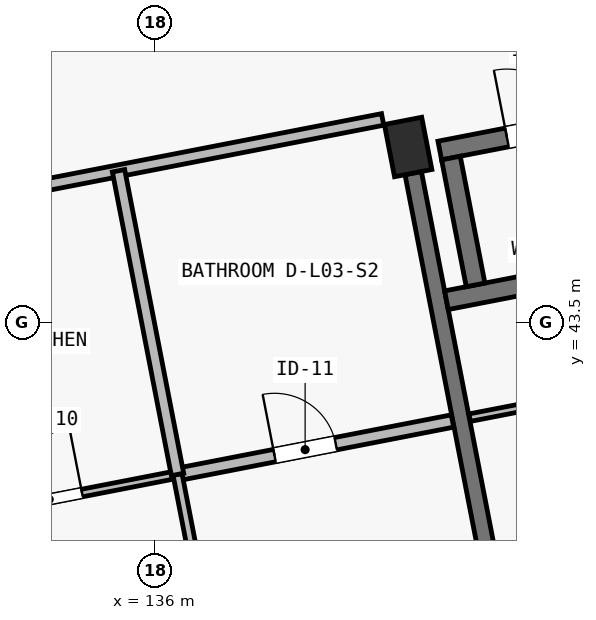
"""IFC4 building model, lengths in metres.
Left out: names, types, materials, properties, quantities, classifications, styles, units other than length and angle.
Written with IfcOpenShell. Run it as: python <this file> out.ifc"""

import sys

from ifc_helpers import new_model, si_unit, direction, frame, frame_2d, origin, origin_2d, place, context, subcontext, project, spatial, rectangle, extrude, element, fill, save


model = new_model("IFC4")
c1 = context("Model", 3, precision=1e-05, world=origin(), true_north=direction((0.0, 1.0)))
c2 = subcontext(c1, "Body", "Model", "MODEL_VIEW")
j1 = project(units=[si_unit("LENGTHUNIT", "METRE"), si_unit("PLANEANGLEUNIT", "RADIAN")], contexts=[c1])
p1 = place(None, origin())
s1 = spatial("IfcSite", under=j1, at=p1, CompositionType="ELEMENT")
p2 = place(p1, origin())
s2 = spatial("IfcBuilding", under=s1, at=p2, CompositionType="ELEMENT")
p3 = place(p2, frame((0.0, 0.0, 11.65)))
s3 = spatial("IfcBuildingStorey", under=s2, at=p3, CompositionType="ELEMENT", Elevation=11.65)
p4 = place(p3, frame((139.331, 45.811, 0.0), z_axis=(0.0, 0.0, 1.0), x_axis=(0.981627183448, 0.190808995377, 0.0)))
e1 = element("IfcColumn", 1, at=p4, inside=s3, PredefinedType="COLUMN", context=c2, shape_type="SweptSolid", body=[
    extrude(rectangle(XDim=0.5, YDim=0.7, at=origin_2d()), origin(), (0.0, 0.0, 1.0), 3.25),
])
p5 = place(p3, frame((140.714, 38.694, 0.0), z_axis=(0.0, 0.0, 1.0), x_axis=(-0.190819465253, 0.981625148252, 0.0)))
e2 = element("IfcWall", 2, at=p5, inside=s3, PredefinedType="SHEAR", context=c2, shape_type="SweptSolid", body=[
    extrude(rectangle(XDim=6.9, YDim=0.22, at=frame_2d((3.45, 0.0))), origin(), (0.0, 0.0, 1.0), 2.5),
])
p6 = place(p3, frame((139.835, 43.795, 0.0), z_axis=(0.0, 0.0, 1.0), x_axis=(0.981624737535, 0.190821578075, 0.0)))
e3 = element("IfcWall", 3, at=p6, inside=s3, PredefinedType="SHEAR", context=c2, shape_type="SweptSolid", body=[
    extrude(rectangle(XDim=2.99, YDim=0.25, at=frame_2d((1.495, 0.0))), origin(), (0.0, 0.0, 1.0), 3.25),
])
p7 = place(p3, frame((139.748, 45.764, 0.0), z_axis=(0.0, 0.0, 1.0), x_axis=(0.981630445883, 0.190792210834, 0.0)))
e4 = element("IfcWall", 4, at=p7, inside=s3, PredefinedType="SHEAR", context=c2, shape_type="SweptSolid", body=[
    extrude(rectangle(XDim=2.7, YDim=0.25, at=frame_2d((1.35, 0.0))), origin(), (0.0, 0.0, 1.0), 3.25),
])
p8 = place(p7, frame((0.9, 0.0, 0.0)))
e5 = element("IfcOpeningElement", 5, at=p8, cuts=e4, PredefinedType="OPENING", context=c2, shape_type="SweptSolid", body=[
    extrude(rectangle(XDim=0.9, YDim=2.05, at=frame_2d((0.45, 1.025))), frame((0.0, 0.14, 0.0), z_axis=(0.0, -1.0, 0.0), x_axis=(1.0, 0.0, 0.0)), (0.0, 0.0, 1.0), 0.28),
])
p9 = place(p3, frame((140.218, 43.997, 0.0), z_axis=(0.0, 0.0, 1.0), x_axis=(-0.190727425199, 0.981643035567, 0.0)))
e6 = element("IfcWall", 6, at=p9, inside=s3, PredefinedType="SHEAR", context=c2, shape_type="SweptSolid", body=[
    extrude(rectangle(XDim=1.7, YDim=0.25, at=frame_2d((0.85, 0.0))), origin(), (0.0, 0.0, 1.0), 3.25),
])
p10 = place(p3, frame((132.046, 44.823, 0.0), z_axis=(0.0, 0.0, 1.0), x_axis=(0.9816234647, 0.190828125677, 0.0)))
e7 = element("IfcWall", 7, at=p10, inside=s3, PredefinedType="PARTITIONING", context=c2, shape_type="SweptSolid", body=[
    extrude(rectangle(XDim=7.08, YDim=0.155, at=frame_2d((3.54, 0.0))), origin(), (0.0, 0.0, 1.0), 2.97),
])
p11 = place(p10, frame((1.33, 0.0, 0.0)))
e8 = element("IfcOpeningElement", 8, at=p11, cuts=e7, PredefinedType="OPENING", context=c2, shape_type="SweptSolid", body=[
    extrude(rectangle(XDim=0.98, YDim=2.15, at=frame_2d((0.49, 1.075))), frame((0.0, 0.093, 0.0), z_axis=(0.0, -1.0, 0.0), x_axis=(1.0, 0.0, 0.0)), (0.0, 0.0, 1.0), 0.185),
])
p12 = place(p3, frame((132.68, 40.8, 0.0), z_axis=(0.0, 0.0, 1.0), x_axis=(0.981626422232, 0.190812911449, 0.0)))
e9 = element("IfcWall", 9, at=p12, inside=s3, PredefinedType="PARTITIONING", context=c2, shape_type="SweptSolid", body=[
    extrude(rectangle(XDim=3.685, YDim=0.1, at=frame_2d((1.842, 0.0))), origin(), (0.0, 0.0, 1.0), 2.97),
])
p13 = place(p12, frame((1.525, 0.0, 0.0)))
e10 = element("IfcOpeningElement", 10, at=p13, cuts=e9, PredefinedType="OPENING", context=c2, shape_type="SweptSolid", body=[
    extrude(rectangle(XDim=0.88, YDim=2.1, at=frame_2d((0.44, 1.05))), frame((0.0, 0.065, 0.0), z_axis=(0.0, -1.0, 0.0), x_axis=(1.0, 0.0, 0.0)), (0.0, 0.0, 1.0), 0.13),
])
p14 = place(p3, frame((136.297, 41.503, 0.0), z_axis=(0.0, 0.0, 1.0), x_axis=(0.981628834294, 0.190800502313, 0.0)))
e11 = element("IfcWall", 11, at=p14, inside=s3, PredefinedType="PLUMBINGWALL", context=c2, shape_type="SweptSolid", body=[
    extrude(rectangle(XDim=3.685, YDim=0.165, at=frame_2d((1.843, 0.0))), origin(), (0.0, 0.0, 1.0), 2.97),
])
p15 = place(p14, frame((1.3, 0.0, 0.0)))
e12 = element("IfcOpeningElement", 12, at=p15, cuts=e11, PredefinedType="OPENING", context=c2, shape_type="SweptSolid", body=[
    extrude(rectangle(XDim=0.82, YDim=2.08, at=frame_2d((0.41, 1.04))), frame((0.0, 0.097, 0.0), z_axis=(0.0, -1.0, 0.0), x_axis=(1.0, 0.0, 0.0)), (0.0, 0.0, 1.0), 0.195),
])
p16 = place(p3, frame((137.125, 37.242, 0.0), z_axis=(0.0, 0.0, 1.0), x_axis=(-0.190812443151, 0.981626513262, 0.0)))
e13 = element("IfcWall", 13, at=p16, inside=s3, PredefinedType="PARTITIONING", context=c2, shape_type="SweptSolid", body=[
    extrude(rectangle(XDim=4.34, YDim=0.12, at=frame_2d((2.17, 0.0))), origin(), (0.0, 0.0, 1.0), 2.97),
])
p17 = place(p16, frame((1.35, 0.0, 0.0)))
e14 = element("IfcOpeningElement", 14, at=p17, cuts=e13, PredefinedType="OPENING", context=c2, shape_type="SweptSolid", body=[
    extrude(rectangle(XDim=0.9, YDim=2.1, at=frame_2d((0.45, 1.05))), frame((0.0, 0.075, 0.0), z_axis=(0.0, -1.0, 0.0), x_axis=(1.0, 0.0, 0.0)), (0.0, 0.0, 1.0), 0.15),
])
p18 = place(p3, frame((136.297, 41.503, 0.0), z_axis=(0.0, 0.0, 1.0), x_axis=(-0.190807044121, 0.981627562731, 0.0)))
e15 = element("IfcWall", 15, at=p18, inside=s3, PredefinedType="PLUMBINGWALL", context=c2, shape_type="SweptSolid", body=[
    extrude(rectangle(XDim=4.07, YDim=0.165, at=frame_2d((2.035, 0.0))), origin(), (0.0, 0.0, 1.0), 2.97),
])
p19 = place(p3, frame((140.14, 42.25, 0.0), z_axis=(0.0, 0.0, 1.0), x_axis=(0.98162014174, 0.190845218255, 0.0)))
e16 = element("IfcWall", 16, at=p19, inside=s3, PredefinedType="PARTITIONING", context=c2, shape_type="SweptSolid", body=[
    extrude(rectangle(XDim=5.08, YDim=0.1, at=frame_2d((2.54, 0.0))), origin(), (0.0, 0.0, 1.0), 2.97),
])
p20 = place(p19, frame((3.595, 0.0, 0.0)))
e17 = element("IfcOpeningElement", 17, at=p20, cuts=e16, PredefinedType="OPENING", context=c2, shape_type="SweptSolid", body=[
    extrude(rectangle(XDim=0.88, YDim=2.1, at=frame_2d((0.44, 1.05))), frame((0.0, 0.065, 0.0), z_axis=(0.0, -1.0, 0.0), x_axis=(1.0, 0.0, 0.0)), (0.0, 0.0, 1.0), 0.13),
])
p21 = place(p3, frame((131.772, 46.909, 0.0), z_axis=(0.0, 0.0, 1.0), x_axis=(0.981622468528, 0.190833249935, 0.0)))
e18 = element("IfcWall", 18, at=p21, inside=s3, PredefinedType="PARTITIONING", context=c2, shape_type="SweptSolid", body=[
    extrude(rectangle(XDim=6.82, YDim=0.155, at=frame_2d((3.41, 0.0))), origin(), (0.0, 0.0, 1.0), 2.97),
])
p22 = place(p21, frame((1.205, 0.0, 0.0)))
e19 = element("IfcOpeningElement", 19, at=p22, cuts=e18, PredefinedType="OPENING", context=c2, shape_type="SweptSolid", body=[
    extrude(rectangle(XDim=0.98, YDim=2.15, at=frame_2d((0.49, 1.075))), frame((0.0, 0.093, 0.0), z_axis=(0.0, -1.0, 0.0), x_axis=(1.0, 0.0, 0.0)), (0.0, 0.0, 1.0), 0.185),
])
p23 = place(p13, origin())
e20 = element("IfcDoor", 20, at=p23, inside=s3, OperationType="SINGLE_SWING_RIGHT", PredefinedType="DOOR", context=c2, shape_type="SweptSolid", body=[
    extrude(rectangle(XDim=0.88, YDim=2.1, at=frame_2d((0.44, 1.05))), frame((0.0, 0.025, 0.0), z_axis=(0.0, -1.0, 0.0), x_axis=(1.0, 0.0, 0.0)), (0.0, 0.0, 1.0), 0.05),
])
fill(e10, e20)
p24 = place(p15, origin())
e21 = element("IfcDoor", 21, at=p24, inside=s3, OperationType="SINGLE_SWING_LEFT", PredefinedType="DOOR", context=c2, shape_type="SweptSolid", body=[
    extrude(rectangle(XDim=0.82, YDim=2.08, at=frame_2d((0.41, 1.04))), frame((0.0, 0.025, 0.0), z_axis=(0.0, -1.0, 0.0), x_axis=(1.0, 0.0, 0.0)), (0.0, 0.0, 1.0), 0.05),
])
fill(e12, e21)
p25 = place(p8, origin())
e22 = element("IfcDoor", 22, at=p25, inside=s3, OperationType="SINGLE_SWING_LEFT", PredefinedType="DOOR", context=c2, shape_type="SweptSolid", body=[
    extrude(rectangle(XDim=0.9, YDim=2.05, at=frame_2d((0.45, 1.025))), frame((0.0, 0.025, 0.0), z_axis=(0.0, -1.0, 0.0), x_axis=(1.0, 0.0, 0.0)), (0.0, 0.0, 1.0), 0.05),
])
fill(e5, e22)
save(model, sys.argv[1])
